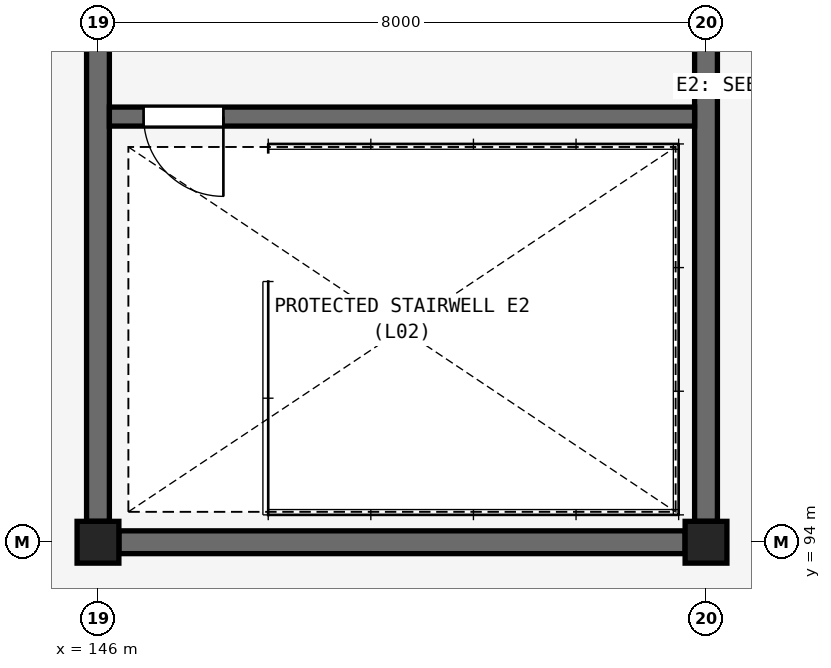
"""IFC4 building model, lengths in metres.
Left out: names, types, materials, properties, quantities, classifications, styles, units other than length and angle.
Written with IfcOpenShell. Run it as: python <this file> out.ifc"""

import sys

from ifc_helpers import new_model, si_unit, direction, frame, frame_2d, origin, origin_2d, place, context, subcontext, project, spatial, rectangle, circle, extrude, element, fill, save


model = new_model("IFC4")
c1 = context("Model", 3, precision=1e-05, world=origin(), true_north=direction((0.0, 1.0)))
c2 = subcontext(c1, "Body", "Model", "MODEL_VIEW")
j1 = project(units=[si_unit("LENGTHUNIT", "METRE"), si_unit("PLANEANGLEUNIT", "RADIAN")], contexts=[c1])
p1 = place(None, origin())
s1 = spatial("IfcSite", under=j1, at=p1, CompositionType="ELEMENT")
p2 = place(p1, origin())
s2 = spatial("IfcBuilding", under=s1, at=p2, CompositionType="ELEMENT")
p3 = place(p2, frame((0.0, 0.0, 10.8)))
s3 = spatial("IfcBuildingStorey", under=s2, at=p3, CompositionType="ELEMENT", Elevation=10.8)
for number, where, z_axis, x_axis in (
    (1, (146.0, 94.0, 0.0), (0.0, 0.0, 1.0), (1.0, 0.0, 0.0)),
    (2, (154.0, 94.0, 0.0), (0.0, 0.0, 1.0), (1.0, 0.0, 0.0)),
):
    element("IfcColumn", number, at=place(p3, frame(where, z_axis=z_axis, x_axis=x_axis)), inside=s3, PredefinedType="COLUMN", context=c2, shape_type="SweptSolid", body=[
        extrude(circle(Radius=0.275, at=origin_2d()), origin(), (0.0, 0.0, 1.0), 4.2),
    ])
for number, where, z_axis, x_axis in (
    (3, (146.275, 94.0, 0.0), (0.0, 0.0, 1.0), (1.0, 0.0, 0.0)),
    (4, (146.0, 94.275, 0.0), (0.0, 0.0, 1.0), (0.0, 1.0, 0.0)),
    (5, (154.0, 94.275, 0.0), (0.0, 0.0, 1.0), (0.0, 1.0, 0.0)),
):
    element("IfcWall", number, at=place(p3, frame(where, z_axis=z_axis, x_axis=x_axis)), inside=s3, PredefinedType="SHEAR", context=c2, shape_type="SweptSolid", body=[
        extrude(rectangle(XDim=7.45, YDim=0.3, at=frame_2d((3.725, 0.0))), origin(), (0.0, 0.0, 1.0), 3.98),
    ])
p4 = place(p3, frame((146.15, 99.6, 0.0), z_axis=(0.0, 0.0, 1.0), x_axis=(1.0, 0.0, 0.0)))
e6 = element("IfcWall", 6, at=p4, inside=s3, PredefinedType="SOLIDWALL", context=c2, shape_type="SweptSolid", body=[
    extrude(rectangle(XDim=7.7, YDim=0.25, at=frame_2d((3.85, 0.0))), origin(), (0.0, 0.0, 1.0), 3.98),
])
p5 = place(p4, frame((0.45, 0.0, 0.0)))
e7 = element("IfcOpeningElement", 7, at=p5, cuts=e6, PredefinedType="OPENING", context=c2, shape_type="SweptSolid", body=[
    extrude(rectangle(XDim=1.05, YDim=2.2, at=frame_2d((0.525, 1.1))), frame((0.0, 0.135, 0.0), z_axis=(0.0, -1.0, 0.0), x_axis=(1.0, 0.0, 0.0)), (0.0, 0.0, 1.0), 0.27),
])
p6 = place(p5, frame((1.05, 0.0, 0.0), z_axis=(0.0, 0.0, 1.0), x_axis=(-1.0, 0.0, 0.0)))
e8 = element("IfcDoor", 8, at=p6, inside=s3, OperationType="SINGLE_SWING_RIGHT", PredefinedType="DOOR", context=c2, shape_type="SweptSolid", body=[
    extrude(rectangle(XDim=1.05, YDim=2.2, at=frame_2d((0.525, 1.1))), frame((0.0, 0.025, 0.0), z_axis=(0.0, -1.0, 0.0), x_axis=(1.0, 0.0, 0.0)), (0.0, 0.0, 1.0), 0.05),
])
fill(e7, e8)
save(model, sys.argv[1])
